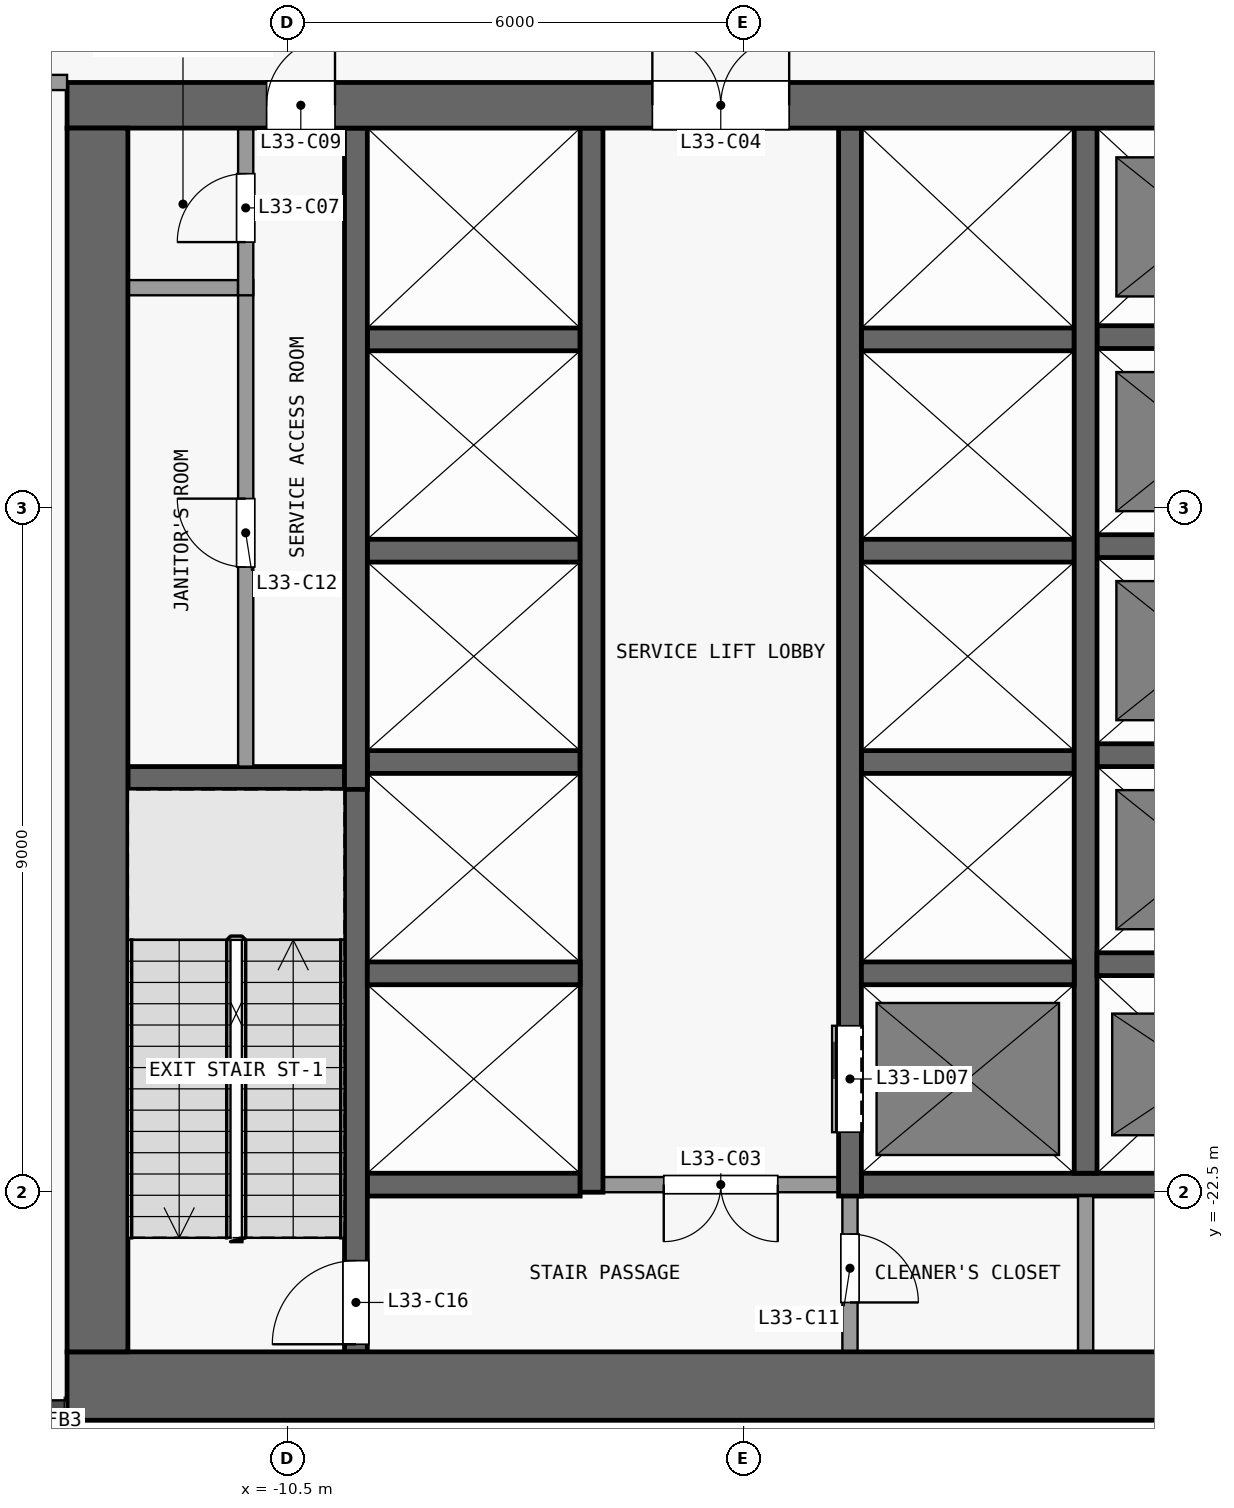
"""IFC4 building model, lengths in metres.
Left out: names, types, materials, properties, quantities, classifications, styles, units other than length and angle.
Written with IfcOpenShell. Run it as: python <this file> out.ifc"""

import sys

from ifc_helpers import new_model, si_unit, direction, frame, frame_2d, origin, place, context, subcontext, project, spatial, rectangle, extrude, element, fill, save


model = new_model("IFC4")
c1 = context("Model", 3, precision=1e-05, world=origin(), true_north=direction((0.0, 1.0)))
c2 = subcontext(c1, "Body", "Model", "MODEL_VIEW")
j1 = project(units=[si_unit("LENGTHUNIT", "METRE"), si_unit("PLANEANGLEUNIT", "RADIAN")], contexts=[c1])
p1 = place(None, origin())
s1 = spatial("IfcSite", under=j1, at=p1, CompositionType="ELEMENT")
p2 = place(p1, origin())
s2 = spatial("IfcBuilding", under=s1, at=p2, CompositionType="ELEMENT")
p3 = place(p2, frame((0.0, 0.0, 133.9)))
s3 = spatial("IfcBuildingStorey", under=s2, at=p3, CompositionType="ELEMENT", Elevation=133.9)
p4 = place(p3, frame((-13.4, -25.05, 0.0), z_axis=(0.0, 0.0, 1.0), x_axis=(1.0, 0.0, 0.0)))
e1 = element("IfcWall", 1, at=p4, inside=s3, PredefinedType="SHEAR", context=c2, shape_type="SweptSolid", body=[
    extrude(rectangle(XDim=26.8, YDim=0.9, at=frame_2d((13.4, 0.0))), origin(), (0.0, 0.0, 1.0), 4.7),
])
p5 = place(p3, frame((-13.4, -8.2, 0.0), z_axis=(0.0, 0.0, 1.0), x_axis=(1.0, 0.0, 0.0)))
e2 = element("IfcWall", 2, at=p5, inside=s3, PredefinedType="SHEAR", context=c2, shape_type="SweptSolid", body=[
    extrude(rectangle(XDim=26.8, YDim=0.6, at=frame_2d((13.4, 0.0))), origin(), (0.0, 0.0, 1.0), 4.7),
])
p6 = place(p5, frame((7.7, 0.0, 0.0)))
e3 = element("IfcOpeningElement", 3, at=p6, cuts=e2, PredefinedType="OPENING", context=c2, shape_type="SweptSolid", body=[
    extrude(rectangle(XDim=1.8, YDim=2.1, at=frame_2d((0.9, 1.05))), frame((0.0, 0.31, 0.0), z_axis=(0.0, -1.0, 0.0), x_axis=(1.0, 0.0, 0.0)), (0.0, 0.0, 1.0), 0.62),
])
p7 = place(p5, frame((17.3, 0.0, 0.0)))
e4 = element("IfcOpeningElement", 4, at=p7, cuts=e2, PredefinedType="OPENING", context=c2, shape_type="SweptSolid", body=[
    extrude(rectangle(XDim=1.8, YDim=2.1, at=frame_2d((0.9, 1.05))), frame((0.0, 0.31, 0.0), z_axis=(0.0, -1.0, 0.0), x_axis=(1.0, 0.0, 0.0)), (0.0, 0.0, 1.0), 0.62),
])
p8 = place(p5, frame((2.625, 0.0, 0.0)))
e5 = element("IfcOpeningElement", 5, at=p8, cuts=e2, PredefinedType="OPENING", context=c2, shape_type="SweptSolid", body=[
    extrude(rectangle(XDim=0.9, YDim=2.1, at=frame_2d((0.45, 1.05))), frame((0.0, 0.31, 0.0), z_axis=(0.0, -1.0, 0.0), x_axis=(1.0, 0.0, 0.0)), (0.0, 0.0, 1.0), 0.62),
])
p9 = place(p5, frame((23.275, 0.0, 0.0)))
e6 = element("IfcOpeningElement", 6, at=p9, cuts=e2, PredefinedType="OPENING", context=c2, shape_type="SweptSolid", body=[
    extrude(rectangle(XDim=0.9, YDim=2.1, at=frame_2d((0.45, 1.05))), frame((0.0, 0.31, 0.0), z_axis=(0.0, -1.0, 0.0), x_axis=(1.0, 0.0, 0.0)), (0.0, 0.0, 1.0), 0.62),
])
p10 = place(p3, frame((-13.0, -24.6, 0.0), z_axis=(0.0, 0.0, 1.0), x_axis=(0.0, 1.0, 0.0)))
e7 = element("IfcWall", 7, at=p10, inside=s3, PredefinedType="SHEAR", context=c2, shape_type="SweptSolid", body=[
    extrude(rectangle(XDim=16.1, YDim=0.8, at=frame_2d((8.05, 0.0))), origin(), (0.0, 0.0, 1.0), 4.7),
])
p11 = place(p3, frame((-9.45, -22.4, 0.0), z_axis=(0.0, 0.0, 1.0), x_axis=(1.0, 0.0, 0.0)))
e8 = element("IfcWall", 8, at=p11, inside=s3, PredefinedType="SHEAR", context=c2, shape_type="SweptSolid", body=[
    extrude(rectangle(XDim=2.8, YDim=0.3, at=frame_2d((1.4, 0.0))), origin(), (0.0, 0.0, 1.0), 4.7),
])
p12 = place(p3, frame((-3.25, -22.4, 0.0), z_axis=(0.0, 0.0, 1.0), x_axis=(-1.0, 0.0, 0.0)))
e9 = element("IfcWall", 9, at=p12, inside=s3, PredefinedType="PARTITIONING", context=c2, shape_type="SweptSolid", body=[
    extrude(rectangle(XDim=3.1, YDim=0.2, at=frame_2d((1.55, 0.0))), origin(), (0.0, 0.0, 1.0), 4.7),
])
p13 = place(p12, frame((0.8, 0.0, 0.0)))
e10 = element("IfcOpeningElement", 10, at=p13, cuts=e9, PredefinedType="OPENING", context=c2, shape_type="SweptSolid", body=[
    extrude(rectangle(XDim=1.5, YDim=2.1, at=frame_2d((0.75, 1.05))), frame((0.0, 0.11, 0.0), z_axis=(0.0, -1.0, 0.0), x_axis=(1.0, 0.0, 0.0)), (0.0, 0.0, 1.0), 0.22),
])
p14 = place(p3, frame((-2.95, -22.4, 0.0), z_axis=(0.0, 0.0, 1.0), x_axis=(1.0, 0.0, 0.0)))
e11 = element("IfcWall", 11, at=p14, inside=s3, PredefinedType="SHEAR", context=c2, shape_type="SweptSolid", body=[
    extrude(rectangle(XDim=5.9, YDim=0.3, at=frame_2d((2.95, 0.0))), origin(), (0.0, 0.0, 1.0), 4.7),
])
for number, where, z_axis, x_axis in (
    (12, (-9.45, -19.62, 0.0), (0.0, 0.0, 1.0), (1.0, 0.0, 0.0)),
    (13, (-2.95, -19.62, 0.0), (0.0, 0.0, 1.0), (1.0, 0.0, 0.0)),
    (14, (0.15, -19.5, 0.0), (0.0, 0.0, 1.0), (1.0, 0.0, 0.0)),
):
    element("IfcWall", number, at=place(p3, frame(where, z_axis=z_axis, x_axis=x_axis)), inside=s3, PredefinedType="SHEAR", context=c2, shape_type="SweptSolid", body=[
        extrude(rectangle(XDim=2.8, YDim=0.3, at=frame_2d((1.4, 0.0))), origin(), (0.0, 0.0, 1.0), 4.7),
    ])
p15 = place(p3, frame((-12.6, -17.05, 0.0), z_axis=(0.0, 0.0, 1.0), x_axis=(1.0, 0.0, 0.0)))
e15 = element("IfcWall", 15, at=p15, inside=s3, PredefinedType="SHEAR", context=c2, shape_type="SweptSolid", body=[
    extrude(rectangle(XDim=2.85, YDim=0.3, at=frame_2d((1.425, 0.0))), origin(), (0.0, 0.0, 1.0), 4.7),
])
for number, where, z_axis, x_axis in (
    (16, (-9.45, -16.84, 0.0), (0.0, 0.0, 1.0), (1.0, 0.0, 0.0)),
    (17, (-2.95, -16.84, 0.0), (0.0, 0.0, 1.0), (1.0, 0.0, 0.0)),
    (18, (0.15, -16.75, 0.0), (0.0, 0.0, 1.0), (1.0, 0.0, 0.0)),
    (19, (-9.45, -14.06, 0.0), (0.0, 0.0, 1.0), (1.0, 0.0, 0.0)),
    (20, (-2.95, -14.06, 0.0), (0.0, 0.0, 1.0), (1.0, 0.0, 0.0)),
    (21, (0.15, -14.0, 0.0), (0.0, 0.0, 1.0), (1.0, 0.0, 0.0)),
    (22, (-9.45, -11.28, 0.0), (0.0, 0.0, 1.0), (1.0, 0.0, 0.0)),
    (23, (-2.95, -11.28, 0.0), (0.0, 0.0, 1.0), (1.0, 0.0, 0.0)),
    (24, (0.15, -11.25, 0.0), (0.0, 0.0, 1.0), (1.0, 0.0, 0.0)),
):
    element("IfcWall", number, at=place(p3, frame(where, z_axis=z_axis, x_axis=x_axis)), inside=s3, PredefinedType="SHEAR", context=c2, shape_type="SweptSolid", body=[
        extrude(rectangle(XDim=2.8, YDim=0.3, at=frame_2d((1.4, 0.0))), origin(), (0.0, 0.0, 1.0), 4.7),
    ])
p16 = place(p3, frame((-12.6, -10.6, 0.0), z_axis=(0.0, 0.0, 1.0), x_axis=(1.0, 0.0, 0.0)))
e25 = element("IfcWall", 25, at=p16, inside=s3, PredefinedType="PARTITIONING", context=c2, shape_type="SweptSolid", body=[
    extrude(rectangle(XDim=1.45, YDim=0.2, at=frame_2d((0.725, 0.0))), origin(), (0.0, 0.0, 1.0), 4.7),
])
p17 = place(p3, frame((-11.05, -16.9, 0.0), z_axis=(0.0, 0.0, 1.0), x_axis=(0.0, 1.0, 0.0)))
e26 = element("IfcWall", 26, at=p17, inside=s3, PredefinedType="PARTITIONING", context=c2, shape_type="SweptSolid", body=[
    extrude(rectangle(XDim=6.4, YDim=0.2, at=frame_2d((3.2, 0.0))), origin(), (0.0, 0.0, 1.0), 4.7),
])
p18 = place(p17, frame((2.625, 0.0, 0.0)))
e27 = element("IfcOpeningElement", 27, at=p18, cuts=e26, PredefinedType="OPENING", context=c2, shape_type="SweptSolid", body=[
    extrude(rectangle(XDim=0.9, YDim=2.1, at=frame_2d((0.45, 1.05))), frame((0.0, 0.11, 0.0), z_axis=(0.0, -1.0, 0.0), x_axis=(1.0, 0.0, 0.0)), (0.0, 0.0, 1.0), 0.22),
])
p19 = place(p3, frame((-11.05, -10.7, 0.0), z_axis=(0.0, 0.0, 1.0), x_axis=(0.0, 1.0, 0.0)))
e28 = element("IfcWall", 28, at=p19, inside=s3, PredefinedType="PARTITIONING", context=c2, shape_type="SweptSolid", body=[
    extrude(rectangle(XDim=2.2, YDim=0.2, at=frame_2d((1.1, 0.0))), origin(), (0.0, 0.0, 1.0), 4.7),
])
p20 = place(p19, frame((0.7, 0.0, 0.0)))
e29 = element("IfcOpeningElement", 29, at=p20, cuts=e28, PredefinedType="OPENING", context=c2, shape_type="SweptSolid", body=[
    extrude(rectangle(XDim=0.9, YDim=2.1, at=frame_2d((0.45, 1.05))), frame((0.0, 0.11, 0.0), z_axis=(0.0, -1.0, 0.0), x_axis=(1.0, 0.0, 0.0)), (0.0, 0.0, 1.0), 0.22),
])
p21 = place(p3, frame((-9.6, -24.6, 0.0), z_axis=(0.0, 0.0, 1.0), x_axis=(0.0, 1.0, 0.0)))
e30 = element("IfcWall", 30, at=p21, inside=s3, PredefinedType="SHEAR", context=c2, shape_type="SweptSolid", body=[
    extrude(rectangle(XDim=7.7, YDim=0.3, at=frame_2d((3.85, 0.0))), origin(), (0.0, 0.0, 1.0), 4.7),
])
p22 = place(p21, frame((0.1, 0.0, 0.0)))
e31 = element("IfcOpeningElement", 31, at=p22, cuts=e30, PredefinedType="OPENING", context=c2, shape_type="SweptSolid", body=[
    extrude(rectangle(XDim=1.1, YDim=2.1, at=frame_2d((0.55, 1.05))), frame((0.0, 0.16, 0.0), z_axis=(0.0, -1.0, 0.0), x_axis=(1.0, 0.0, 0.0)), (0.0, 0.0, 1.0), 0.32),
])
p23 = place(p3, frame((-9.6, -17.2, 0.0), z_axis=(0.0, 0.0, 1.0), x_axis=(0.0, 1.0, 0.0)))
e32 = element("IfcWall", 32, at=p23, inside=s3, PredefinedType="SHEAR", context=c2, shape_type="SweptSolid", body=[
    extrude(rectangle(XDim=8.7, YDim=0.3, at=frame_2d((4.35, 0.0))), origin(), (0.0, 0.0, 1.0), 4.7),
])
p24 = place(p3, frame((-6.5, -22.5, 0.0), z_axis=(0.0, 0.0, 1.0), x_axis=(0.0, 1.0, 0.0)))
e33 = element("IfcWall", 33, at=p24, inside=s3, PredefinedType="SHEAR", context=c2, shape_type="SweptSolid", body=[
    extrude(rectangle(XDim=14.0, YDim=0.3, at=frame_2d((7.0, 0.0))), origin(), (0.0, 0.0, 1.0), 4.7),
])
p25 = place(p3, frame((-3.1, -22.55, 0.0), z_axis=(0.0, 0.0, 1.0), x_axis=(0.0, -1.0, 0.0)))
e34 = element("IfcWall", 34, at=p25, inside=s3, PredefinedType="PARTITIONING", context=c2, shape_type="SweptSolid", body=[
    extrude(rectangle(XDim=2.05, YDim=0.2, at=frame_2d((1.025, 0.0))), origin(), (0.0, 0.0, 1.0), 4.7),
])
p26 = place(p25, frame((0.5, 0.0, 0.0)))
e35 = element("IfcOpeningElement", 35, at=p26, cuts=e34, PredefinedType="OPENING", context=c2, shape_type="SweptSolid", body=[
    extrude(rectangle(XDim=0.9, YDim=2.1, at=frame_2d((0.45, 1.05))), frame((0.0, 0.11, 0.0), z_axis=(0.0, -1.0, 0.0), x_axis=(1.0, 0.0, 0.0)), (0.0, 0.0, 1.0), 0.22),
])
p27 = place(p3, frame((-3.1, -22.55, 0.0), z_axis=(0.0, 0.0, 1.0), x_axis=(0.0, 1.0, 0.0)))
e36 = element("IfcWall", 36, at=p27, inside=s3, PredefinedType="SHEAR", context=c2, shape_type="SweptSolid", body=[
    extrude(rectangle(XDim=14.05, YDim=0.3, at=frame_2d((7.025, 0.0))), origin(), (0.0, 0.0, 1.0), 4.7),
])
p28 = place(p27, frame((0.84, 0.0, 0.0)))
e37 = element("IfcOpeningElement", 37, at=p28, cuts=e36, PredefinedType="OPENING", context=c2, shape_type="SweptSolid", body=[
    extrude(rectangle(XDim=1.4, YDim=2.1, at=frame_2d((0.7, 1.05))), frame((0.0, 0.16, 0.0), z_axis=(0.0, -1.0, 0.0), x_axis=(1.0, 0.0, 0.0)), (0.0, 0.0, 1.0), 0.32),
])
p29 = place(p3, frame((0.0, -24.6, 0.0), z_axis=(0.0, 0.0, 1.0), x_axis=(0.0, 1.0, 0.0)))
e38 = element("IfcWall", 38, at=p29, inside=s3, PredefinedType="PARTITIONING", context=c2, shape_type="SweptSolid", body=[
    extrude(rectangle(XDim=2.05, YDim=0.2, at=frame_2d((1.025, 0.0))), origin(), (0.0, 0.0, 1.0), 4.7),
])
p30 = place(p3, frame((0.0, -22.25, 0.0), z_axis=(0.0, 0.0, 1.0), x_axis=(0.0, 1.0, 0.0)))
e39 = element("IfcWall", 39, at=p30, inside=s3, PredefinedType="SHEAR", context=c2, shape_type="SweptSolid", body=[
    extrude(rectangle(XDim=13.75, YDim=0.3, at=frame_2d((6.875, 0.0))), origin(), (0.0, 0.0, 1.0), 4.7),
])
p31 = place(p3, frame((-25.238, -7.9, 0.0), z_axis=(0.0, 0.0, 1.0), x_axis=(1.0, 0.0, 0.0)))
e40 = element("IfcWall", 40, at=p31, inside=s3, PredefinedType="PARTITIONING", context=c2, shape_type="SweptSolid", body=[
    extrude(rectangle(XDim=11.838, YDim=0.2, at=frame_2d((5.919, 0.0))), origin(), (0.0, 0.0, 1.0), 4.7),
])
p32 = place(p31, frame((1.788, 0.0, 0.0)))
e41 = element("IfcOpeningElement", 41, at=p32, cuts=e40, PredefinedType="OPENING", context=c2, shape_type="SweptSolid", body=[
    extrude(rectangle(XDim=1.0, YDim=2.1, at=frame_2d((0.5, 1.05))), frame((0.0, 0.11, 0.0), z_axis=(0.0, -1.0, 0.0), x_axis=(1.0, 0.0, 0.0)), (0.0, 0.0, 1.0), 0.22),
])
p33 = place(p31, frame((8.988, 0.0, 0.0)))
e42 = element("IfcOpeningElement", 42, at=p33, cuts=e40, PredefinedType="OPENING", context=c2, shape_type="SweptSolid", body=[
    extrude(rectangle(XDim=1.0, YDim=2.1, at=frame_2d((0.5, 1.05))), frame((0.0, 0.11, 0.0), z_axis=(0.0, -1.0, 0.0), x_axis=(1.0, 0.0, 0.0)), (0.0, 0.0, 1.0), 0.22),
])
p34 = place(p28, origin())
e43 = element("IfcDoor", 43, at=p34, inside=s3, OperationType="DOUBLE_DOOR_SLIDING", PredefinedType="DOOR", context=c2, shape_type="SweptSolid", body=[
    extrude(rectangle(XDim=1.4, YDim=2.1, at=frame_2d((0.7, 1.05))), frame((0.0, 0.025, 0.0), z_axis=(0.0, -1.0, 0.0), x_axis=(1.0, 0.0, 0.0)), (0.0, 0.0, 1.0), 0.05),
])
fill(e37, e43)
p35 = place(p13, origin())
e44 = element("IfcDoor", 44, at=p35, inside=s3, OperationType="DOUBLE_DOOR_SINGLE_SWING", PredefinedType="DOOR", context=c2, shape_type="SweptSolid", body=[
    extrude(rectangle(XDim=1.5, YDim=2.1, at=frame_2d((0.75, 1.05))), frame((0.0, 0.025, 0.0), z_axis=(0.0, -1.0, 0.0), x_axis=(1.0, 0.0, 0.0)), (0.0, 0.0, 1.0), 0.05),
])
fill(e10, e44)
p36 = place(p6, origin())
e45 = element("IfcDoor", 45, at=p36, inside=s3, OperationType="DOUBLE_DOOR_SINGLE_SWING", PredefinedType="DOOR", context=c2, shape_type="SweptSolid", body=[
    extrude(rectangle(XDim=1.8, YDim=2.1, at=frame_2d((0.9, 1.05))), frame((0.0, 0.025, 0.0), z_axis=(0.0, -1.0, 0.0), x_axis=(1.0, 0.0, 0.0)), (0.0, 0.0, 1.0), 0.05),
])
fill(e3, e45)
p37 = place(p20, origin())
e46 = element("IfcDoor", 46, at=p37, inside=s3, OperationType="SINGLE_SWING_LEFT", PredefinedType="DOOR", context=c2, shape_type="SweptSolid", body=[
    extrude(rectangle(XDim=0.9, YDim=2.1, at=frame_2d((0.45, 1.05))), frame((0.0, 0.025, 0.0), z_axis=(0.0, -1.0, 0.0), x_axis=(1.0, 0.0, 0.0)), (0.0, 0.0, 1.0), 0.05),
])
fill(e29, e46)
p38 = place(p8, origin())
e47 = element("IfcDoor", 47, at=p38, inside=s3, OperationType="SINGLE_SWING_RIGHT", PredefinedType="DOOR", context=c2, shape_type="SweptSolid", body=[
    extrude(rectangle(XDim=0.9, YDim=2.1, at=frame_2d((0.45, 1.05))), frame((0.0, 0.025, 0.0), z_axis=(0.0, -1.0, 0.0), x_axis=(1.0, 0.0, 0.0)), (0.0, 0.0, 1.0), 0.05),
])
fill(e5, e47)
p39 = place(p26, origin())
e48 = element("IfcDoor", 48, at=p39, inside=s3, OperationType="SINGLE_SWING_RIGHT", PredefinedType="DOOR", context=c2, shape_type="SweptSolid", body=[
    extrude(rectangle(XDim=0.9, YDim=2.1, at=frame_2d((0.45, 1.05))), frame((0.0, 0.025, 0.0), z_axis=(0.0, -1.0, 0.0), x_axis=(1.0, 0.0, 0.0)), (0.0, 0.0, 1.0), 0.05),
])
fill(e35, e48)
p40 = place(p18, origin())
e49 = element("IfcDoor", 49, at=p40, inside=s3, OperationType="SINGLE_SWING_RIGHT", PredefinedType="DOOR", context=c2, shape_type="SweptSolid", body=[
    extrude(rectangle(XDim=0.9, YDim=2.1, at=frame_2d((0.45, 1.05))), frame((0.0, 0.025, 0.0), z_axis=(0.0, -1.0, 0.0), x_axis=(1.0, 0.0, 0.0)), (0.0, 0.0, 1.0), 0.05),
])
fill(e27, e49)
p41 = place(p22, origin())
e50 = element("IfcDoor", 50, at=p41, inside=s3, OperationType="SINGLE_SWING_LEFT", PredefinedType="DOOR", context=c2, shape_type="SweptSolid", body=[
    extrude(rectangle(XDim=1.1, YDim=2.1, at=frame_2d((0.55, 1.05))), frame((0.0, 0.025, 0.0), z_axis=(0.0, -1.0, 0.0), x_axis=(1.0, 0.0, 0.0)), (0.0, 0.0, 1.0), 0.05),
])
fill(e31, e50)
save(model, sys.argv[1])
